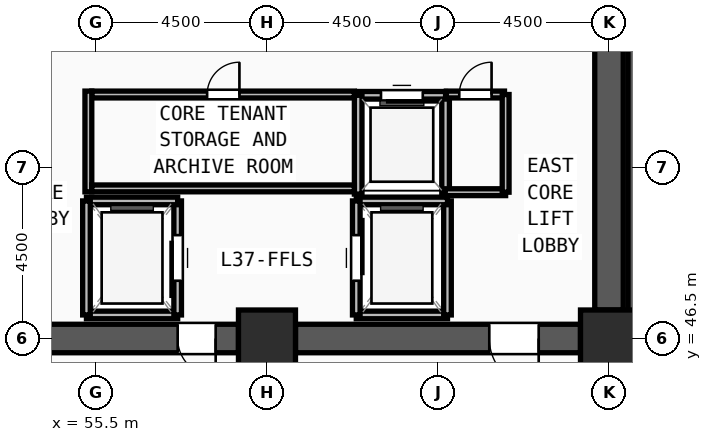
"""IFC4 building model, lengths in metres.
Left out: names, types, materials, properties, quantities, classifications, styles, units other than length and angle.
Written with IfcOpenShell. Run it as: python <this file> out.ifc"""

import sys

from ifc_helpers import new_model, si_unit, direction, frame, frame_2d, origin, origin_2d, place, context, subcontext, project, spatial, rectangle, extrude, source, transform, mapped, element, fill, save


model = new_model("IFC4")
c1 = context("Model", 3, precision=1e-05, world=origin(), true_north=direction((0.0, 1.0)))
c2 = subcontext(c1, "Body", "Model", "MODEL_VIEW")
j1 = project(units=[si_unit("LENGTHUNIT", "METRE"), si_unit("PLANEANGLEUNIT", "RADIAN")], contexts=[c1])
p1 = place(None, origin())
s1 = spatial("IfcSite", under=j1, at=p1, CompositionType="ELEMENT")
p2 = place(p1, origin())
s2 = spatial("IfcBuilding", under=s1, at=p2, CompositionType="ELEMENT")
p3 = place(p2, frame((0.0, 0.0, 144.0)))
s3 = spatial("IfcBuildingStorey", under=s2, at=p3, CompositionType="ELEMENT", Elevation=144.0)
m1 = source(origin(), c2, "Body", "SweptSolid", [
    extrude(rectangle(XDim=1.5, YDim=1.5, at=origin_2d()), origin(), (0.0, 0.0, 1.0), 3.75),
])
for number, where, z_axis, x_axis in (
    (1, (60.0, 46.5, 0.0), (0.0, 0.0, 1.0), (1.0, 0.0, 0.0)),
    (2, (69.0, 46.5, 0.0), (0.0, 0.0, 1.0), (1.0, 0.0, 0.0)),
):
    element("IfcColumn", number, at=place(p3, frame(where, z_axis=z_axis, x_axis=x_axis)), inside=s3, PredefinedType="COLUMN", context=c2, shape_type="MappedRepresentation", body=[
        mapped(m1, transform((0.0, 0.0, 0.0), x_axis=(1.0, 0.0, 0.0), y_axis=(0.0, 1.0, 0.0), z_axis=(0.0, 0.0, 1.0), scale=1.0)),
    ])
p4 = place(p3, frame((69.0, 60.75, 0.0), z_axis=(0.0, 0.0, 1.0), x_axis=(0.0, -1.0, 0.0)))
e3 = element("IfcWall", 3, at=p4, inside=s3, PredefinedType="SHEAR", context=c2, shape_type="SweptSolid", body=[
    extrude(rectangle(XDim=13.5, YDim=0.75, at=frame_2d((6.75, 0.0))), origin(), (0.0, 0.0, 1.0), 3.57),
])
m2 = source(origin(), c2, "Body", "SweptSolid", [
    extrude(rectangle(XDim=1.2, YDim=2.2, at=frame_2d((0.6, 1.1))), frame((0.0, 0.385, 0.0), z_axis=(0.0, -1.0, 0.0), x_axis=(1.0, 0.0, 0.0)), (0.0, 0.0, 1.0), 0.77),
])
p5 = place(p4, frame((1.2, 0.0, 0.0)))
e4 = element("IfcOpeningElement", 4, at=p5, cuts=e3, PredefinedType="OPENING", context=c2, shape_type="MappedRepresentation", body=[
    mapped(m2, transform((0.0, 0.0, 0.0), x_axis=(1.0, 0.0, 0.0), y_axis=(0.0, 1.0, 0.0), z_axis=(0.0, 0.0, 1.0), scale=1.0)),
])
p6 = place(p3, frame((68.25, 46.5, 0.0), z_axis=(0.0, 0.0, 1.0), x_axis=(-1.0, 0.0, 0.0)))
e5 = element("IfcWall", 5, at=p6, inside=s3, PredefinedType="SHEAR", context=c2, shape_type="SweptSolid", body=[
    extrude(rectangle(XDim=7.5, YDim=0.75, at=frame_2d((3.75, 0.0))), origin(), (0.0, 0.0, 1.0), 3.57),
])
m3 = source(origin(), c2, "Body", "SweptSolid", [
    extrude(rectangle(XDim=1.3, YDim=2.2, at=frame_2d((0.65, 1.1))), frame((0.0, 0.385, 0.0), z_axis=(0.0, -1.0, 0.0), x_axis=(1.0, 0.0, 0.0)), (0.0, 0.0, 1.0), 0.77),
])
p7 = place(p6, frame((1.1, 0.0, 0.0)))
e6 = element("IfcOpeningElement", 6, at=p7, cuts=e5, PredefinedType="OPENING", context=c2, shape_type="MappedRepresentation", body=[
    mapped(m3, transform((0.0, 0.0, 0.0), x_axis=(1.0, 0.0, 0.0), y_axis=(0.0, 1.0, 0.0), z_axis=(0.0, 0.0, 1.0), scale=1.0)),
])
p8 = place(p3, frame((59.25, 46.5, 0.0), z_axis=(0.0, 0.0, 1.0), x_axis=(-1.0, 0.0, 0.0)))
e7 = element("IfcWall", 7, at=p8, inside=s3, PredefinedType="SHEAR", context=c2, shape_type="SweptSolid", body=[
    extrude(rectangle(XDim=7.5, YDim=0.75, at=frame_2d((3.75, 0.0))), origin(), (0.0, 0.0, 1.0), 3.57),
])
p9 = place(p8, frame((5.1, 0.0, 0.0)))
e8 = element("IfcOpeningElement", 8, at=p9, cuts=e7, PredefinedType="OPENING", context=c2, shape_type="MappedRepresentation", body=[
    mapped(m3, transform((0.0, 0.0, 0.0), x_axis=(1.0, 0.0, 0.0), y_axis=(0.0, 1.0, 0.0), z_axis=(0.0, 0.0, 1.0), scale=1.0)),
])
m4 = source(origin(), c2, "Body", "SweptSolid", [
    extrude(rectangle(XDim=1.0, YDim=2.2, at=frame_2d((0.5, 1.1))), frame((0.0, 0.385, 0.0), z_axis=(0.0, -1.0, 0.0), x_axis=(1.0, 0.0, 0.0)), (0.0, 0.0, 1.0), 0.77),
])
p10 = place(p8, frame((0.6, 0.0, 0.0)))
e9 = element("IfcOpeningElement", 9, at=p10, cuts=e7, PredefinedType="OPENING", context=c2, shape_type="MappedRepresentation", body=[
    mapped(m4, transform((0.0, 0.0, 0.0), x_axis=(1.0, 0.0, 0.0), y_axis=(0.0, 1.0, 0.0), z_axis=(0.0, 0.0, 1.0), scale=1.0)),
])
p11 = place(p3, frame((69.62, 54.52, 0.0), z_axis=(0.0, 0.0, 1.0), x_axis=(0.0, -1.0, 0.0)))
e10 = element("IfcWall", 10, at=p11, inside=s3, PredefinedType="SOLIDWALL", context=c2, shape_type="SweptSolid", body=[
    extrude(rectangle(XDim=7.82, YDim=0.24, at=frame_2d((3.91, 0.0))), origin(), (0.0, 0.0, 1.0), 3.57),
])
p12 = place(p3, frame((55.25, 47.12, 0.0), z_axis=(0.0, 0.0, 1.0), x_axis=(1.0, 0.0, 0.0)))
e11 = element("IfcWall", 11, at=p12, inside=s3, PredefinedType="SOLIDWALL", context=c2, shape_type="SweptSolid", body=[
    extrude(rectangle(XDim=2.4, YDim=0.2, at=frame_2d((1.2, 0.0))), origin(), (0.0, 0.0, 1.0), 3.57),
])
p13 = place(p3, frame((57.65, 47.12, 0.0), z_axis=(0.0, 0.0, 1.0), x_axis=(0.0, 1.0, 0.0)))
e12 = element("IfcWall", 12, at=p13, inside=s3, PredefinedType="SOLIDWALL", context=c2, shape_type="SweptSolid", body=[
    extrude(rectangle(XDim=3.0, YDim=0.2, at=frame_2d((1.5, 0.0))), origin(), (0.0, 0.0, 1.0), 3.57),
])
m5 = source(origin(), c2, "Body", "SweptSolid", [
    extrude(rectangle(XDim=1.2, YDim=2.3, at=frame_2d((0.6, 1.15))), frame((0.0, 0.11, 0.0), z_axis=(0.0, -1.0, 0.0), x_axis=(1.0, 0.0, 0.0)), (0.0, 0.0, 1.0), 0.22),
])
p14 = place(p13, frame((0.9, 0.0, 0.0)))
e13 = element("IfcOpeningElement", 13, at=p14, cuts=e12, PredefinedType="OPENING", context=c2, shape_type="MappedRepresentation", body=[
    mapped(m5, transform((0.0, 0.0, 0.0), x_axis=(1.0, 0.0, 0.0), y_axis=(0.0, 1.0, 0.0), z_axis=(0.0, 0.0, 1.0), scale=1.0)),
])
p15 = place(p3, frame((57.65, 50.12, 0.0), z_axis=(0.0, 0.0, 1.0), x_axis=(-1.0, 0.0, 0.0)))
e14 = element("IfcWall", 14, at=p15, inside=s3, PredefinedType="SOLIDWALL", context=c2, shape_type="SweptSolid", body=[
    extrude(rectangle(XDim=2.4, YDim=0.2, at=frame_2d((1.2, 0.0))), origin(), (0.0, 0.0, 1.0), 3.57),
])
p16 = place(p3, frame((55.25, 50.12, 0.0), z_axis=(0.0, 0.0, 1.0), x_axis=(0.0, -1.0, 0.0)))
e15 = element("IfcWall", 15, at=p16, inside=s3, PredefinedType="SOLIDWALL", context=c2, shape_type="SweptSolid", body=[
    extrude(rectangle(XDim=3.0, YDim=0.2, at=frame_2d((1.5, 0.0))), origin(), (0.0, 0.0, 1.0), 3.57),
])
p17 = place(p3, frame((62.35, 47.12, 0.0), z_axis=(0.0, 0.0, 1.0), x_axis=(1.0, 0.0, 0.0)))
e16 = element("IfcWall", 16, at=p17, inside=s3, PredefinedType="SOLIDWALL", context=c2, shape_type="SweptSolid", body=[
    extrude(rectangle(XDim=2.4, YDim=0.2, at=frame_2d((1.2, 0.0))), origin(), (0.0, 0.0, 1.0), 3.57),
])
p18 = place(p3, frame((64.75, 47.12, 0.0), z_axis=(0.0, 0.0, 1.0), x_axis=(0.0, 1.0, 0.0)))
e17 = element("IfcWall", 17, at=p18, inside=s3, PredefinedType="SOLIDWALL", context=c2, shape_type="SweptSolid", body=[
    extrude(rectangle(XDim=3.0, YDim=0.2, at=frame_2d((1.5, 0.0))), origin(), (0.0, 0.0, 1.0), 3.57),
])
p19 = place(p3, frame((64.75, 50.12, 0.0), z_axis=(0.0, 0.0, 1.0), x_axis=(-1.0, 0.0, 0.0)))
e18 = element("IfcWall", 18, at=p19, inside=s3, PredefinedType="SOLIDWALL", context=c2, shape_type="SweptSolid", body=[
    extrude(rectangle(XDim=2.4, YDim=0.2, at=frame_2d((1.2, 0.0))), origin(), (0.0, 0.0, 1.0), 3.57),
])
p20 = place(p3, frame((62.35, 50.12, 0.0), z_axis=(0.0, 0.0, 1.0), x_axis=(0.0, -1.0, 0.0)))
e19 = element("IfcWall", 19, at=p20, inside=s3, PredefinedType="SOLIDWALL", context=c2, shape_type="SweptSolid", body=[
    extrude(rectangle(XDim=3.0, YDim=0.2, at=frame_2d((1.5, 0.0))), origin(), (0.0, 0.0, 1.0), 3.57),
])
p21 = place(p20, frame((0.9, 0.0, 0.0)))
e20 = element("IfcOpeningElement", 20, at=p21, cuts=e19, PredefinedType="OPENING", context=c2, shape_type="MappedRepresentation", body=[
    mapped(m5, transform((0.0, 0.0, 0.0), x_axis=(1.0, 0.0, 0.0), y_axis=(0.0, 1.0, 0.0), z_axis=(0.0, 0.0, 1.0), scale=1.0)),
])
p22 = place(p3, frame((64.7, 50.3, 0.0), z_axis=(0.0, 0.0, 1.0), x_axis=(0.0, 1.0, 0.0)))
e21 = element("IfcWall", 21, at=p22, inside=s3, PredefinedType="SOLIDWALL", context=c2, shape_type="SweptSolid", body=[
    extrude(rectangle(XDim=2.6, YDim=0.2, at=frame_2d((1.3, 0.0))), origin(), (0.0, 0.0, 1.0), 3.57),
])
p23 = place(p3, frame((64.7, 52.9, 0.0), z_axis=(0.0, 0.0, 1.0), x_axis=(-1.0, 0.0, 0.0)))
e22 = element("IfcWall", 22, at=p23, inside=s3, PredefinedType="SOLIDWALL", context=c2, shape_type="SweptSolid", body=[
    extrude(rectangle(XDim=2.3, YDim=0.2, at=frame_2d((1.15, 0.0))), origin(), (0.0, 0.0, 1.0), 3.57),
])
m6 = source(origin(), c2, "Body", "SweptSolid", [
    extrude(rectangle(XDim=1.1, YDim=2.2, at=frame_2d((0.55, 1.1))), frame((0.0, 0.11, 0.0), z_axis=(0.0, -1.0, 0.0), x_axis=(1.0, 0.0, 0.0)), (0.0, 0.0, 1.0), 0.22),
])
p24 = place(p23, frame((0.6, 0.0, 0.0)))
e23 = element("IfcOpeningElement", 23, at=p24, cuts=e22, PredefinedType="OPENING", context=c2, shape_type="MappedRepresentation", body=[
    mapped(m6, transform((0.0, 0.0, 0.0), x_axis=(1.0, 0.0, 0.0), y_axis=(0.0, 1.0, 0.0), z_axis=(0.0, 0.0, 1.0), scale=1.0)),
])
p25 = place(p3, frame((62.4, 52.9, 0.0), z_axis=(0.0, 0.0, 1.0), x_axis=(0.0, -1.0, 0.0)))
e24 = element("IfcWall", 24, at=p25, inside=s3, PredefinedType="SOLIDWALL", context=c2, shape_type="SweptSolid", body=[
    extrude(rectangle(XDim=2.6, YDim=0.2, at=frame_2d((1.3, 0.0))), origin(), (0.0, 0.0, 1.0), 3.57),
])
p26 = place(p3, frame((55.39, 52.92, 0.0), z_axis=(0.0, 0.0, 1.0), x_axis=(1.0, 0.0, 0.0)))
e25 = element("IfcWall", 25, at=p26, inside=s3, PredefinedType="PARTITIONING", context=c2, shape_type="SweptSolid", body=[
    extrude(rectangle(XDim=6.91, YDim=0.18, at=frame_2d((3.455, 0.0))), origin(), (0.0, 0.0, 1.0), 3.57),
])
m7 = source(origin(), c2, "Body", "SweptSolid", [
    extrude(rectangle(XDim=0.85, YDim=2.1, at=frame_2d((0.425, 1.05))), frame((0.0, 0.1, 0.0), z_axis=(0.0, -1.0, 0.0), x_axis=(1.0, 0.0, 0.0)), (0.0, 0.0, 1.0), 0.2),
])
p27 = place(p26, frame((3.035, 0.0, 0.0)))
e26 = element("IfcOpeningElement", 26, at=p27, cuts=e25, PredefinedType="OPENING", context=c2, shape_type="MappedRepresentation", body=[
    mapped(m7, transform((0.0, 0.0, 0.0), x_axis=(1.0, 0.0, 0.0), y_axis=(0.0, 1.0, 0.0), z_axis=(0.0, 0.0, 1.0), scale=1.0)),
])
p28 = place(p3, frame((64.72, 52.92, 0.0), z_axis=(0.0, 0.0, 1.0), x_axis=(1.0, 0.0, 0.0)))
e27 = element("IfcWall", 27, at=p28, inside=s3, PredefinedType="PARTITIONING", context=c2, shape_type="SweptSolid", body=[
    extrude(rectangle(XDim=1.53, YDim=0.18, at=frame_2d((0.765, 0.0))), origin(), (0.0, 0.0, 1.0), 3.57),
])
p29 = place(p28, frame((0.34, 0.0, 0.0)))
e28 = element("IfcOpeningElement", 28, at=p29, cuts=e27, PredefinedType="OPENING", context=c2, shape_type="MappedRepresentation", body=[
    mapped(m7, transform((0.0, 0.0, 0.0), x_axis=(1.0, 0.0, 0.0), y_axis=(0.0, 1.0, 0.0), z_axis=(0.0, 0.0, 1.0), scale=1.0)),
])
p30 = place(p3, frame((64.69, 50.35, 0.0), z_axis=(0.0, 0.0, 1.0), x_axis=(1.0, 0.0, 0.0)))
e29 = element("IfcWall", 29, at=p30, inside=s3, PredefinedType="PARTITIONING", context=c2, shape_type="SweptSolid", body=[
    extrude(rectangle(XDim=1.59, YDim=0.18, at=frame_2d((0.795, 0.0))), origin(), (0.0, 0.0, 1.0), 3.57),
])
p31 = place(p3, frame((66.28, 50.35, 0.0), z_axis=(0.0, 0.0, 1.0), x_axis=(0.0, 1.0, 0.0)))
e30 = element("IfcWall", 30, at=p31, inside=s3, PredefinedType="PARTITIONING", context=c2, shape_type="SweptSolid", body=[
    extrude(rectangle(XDim=2.57, YDim=0.18, at=frame_2d((1.285, 0.0))), origin(), (0.0, 0.0, 1.0), 3.57),
])
p32 = place(p3, frame((55.3, 50.36, 0.0), z_axis=(0.0, 0.0, 1.0), x_axis=(0.0, 1.0, 0.0)))
e31 = element("IfcWall", 31, at=p32, inside=s3, PredefinedType="PARTITIONING", context=c2, shape_type="SweptSolid", body=[
    extrude(rectangle(XDim=2.65, YDim=0.18, at=frame_2d((1.325, 0.0))), origin(), (0.0, 0.0, 1.0), 3.57),
])
p33 = place(p3, frame((55.39, 50.45, 0.0), z_axis=(0.0, 0.0, 1.0), x_axis=(1.0, 0.0, 0.0)))
e32 = element("IfcWall", 32, at=p33, inside=s3, PredefinedType="PARTITIONING", context=c2, shape_type="SweptSolid", body=[
    extrude(rectangle(XDim=6.91, YDim=0.18, at=frame_2d((3.455, 0.0))), origin(), (0.0, 0.0, 1.0), 3.57),
])
m8 = source(origin(), c2, "Body", "SweptSolid", [
    extrude(rectangle(XDim=1.0, YDim=2.2, at=frame_2d((0.5, 1.1))), frame((0.0, 0.025, 0.0), z_axis=(0.0, -1.0, 0.0), x_axis=(1.0, 0.0, 0.0)), (0.0, 0.0, 1.0), 0.05),
])
p34 = place(p10, origin())
e33 = element("IfcDoor", 33, at=p34, inside=s3, OperationType="SINGLE_SWING_LEFT", PredefinedType="DOOR", context=c2, shape_type="MappedRepresentation", body=[
    mapped(m8, transform((0.0, 0.0, 0.0), x_axis=(1.0, 0.0, 0.0), y_axis=(0.0, 1.0, 0.0), z_axis=(0.0, 0.0, 1.0), scale=1.0)),
])
fill(e9, e33)
m9 = source(origin(), c2, "Body", "SweptSolid", [
    extrude(rectangle(XDim=1.3, YDim=2.2, at=frame_2d((0.65, 1.1))), frame((0.0, 0.025, 0.0), z_axis=(0.0, -1.0, 0.0), x_axis=(1.0, 0.0, 0.0)), (0.0, 0.0, 1.0), 0.05),
])
p35 = place(p7, origin())
e34 = element("IfcDoor", 34, at=p35, inside=s3, OperationType="SINGLE_SWING_LEFT", PredefinedType="DOOR", context=c2, shape_type="MappedRepresentation", body=[
    mapped(m9, transform((0.0, 0.0, 0.0), x_axis=(1.0, 0.0, 0.0), y_axis=(0.0, 1.0, 0.0), z_axis=(0.0, 0.0, 1.0), scale=1.0)),
])
fill(e6, e34)
m10 = source(origin(), c2, "Body", "SweptSolid", [
    extrude(rectangle(XDim=1.2, YDim=2.3, at=frame_2d((0.6, 1.15))), frame((0.0, 0.025, 0.0), z_axis=(0.0, -1.0, 0.0), x_axis=(1.0, 0.0, 0.0)), (0.0, 0.0, 1.0), 0.05),
])
p36 = place(p14, origin())
e35 = element("IfcDoor", 35, at=p36, inside=s3, OperationType="SLIDING_TO_LEFT", PredefinedType="DOOR", context=c2, shape_type="MappedRepresentation", body=[
    mapped(m10, transform((0.0, 0.0, 0.0), x_axis=(1.0, 0.0, 0.0), y_axis=(0.0, 1.0, 0.0), z_axis=(0.0, 0.0, 1.0), scale=1.0)),
])
fill(e13, e35)
p37 = place(p21, origin())
e36 = element("IfcDoor", 36, at=p37, inside=s3, OperationType="SLIDING_TO_LEFT", PredefinedType="DOOR", context=c2, shape_type="MappedRepresentation", body=[
    mapped(m10, transform((0.0, 0.0, 0.0), x_axis=(1.0, 0.0, 0.0), y_axis=(0.0, 1.0, 0.0), z_axis=(0.0, 0.0, 1.0), scale=1.0)),
])
fill(e20, e36)
m11 = source(origin(), c2, "Body", "SweptSolid", [
    extrude(rectangle(XDim=1.1, YDim=2.2, at=frame_2d((0.55, 1.1))), frame((0.0, 0.025, 0.0), z_axis=(0.0, -1.0, 0.0), x_axis=(1.0, 0.0, 0.0)), (0.0, 0.0, 1.0), 0.05),
])
p38 = place(p24, origin())
e37 = element("IfcDoor", 37, at=p38, inside=s3, OperationType="SLIDING_TO_LEFT", PredefinedType="DOOR", context=c2, shape_type="MappedRepresentation", body=[
    mapped(m11, transform((0.0, 0.0, 0.0), x_axis=(1.0, 0.0, 0.0), y_axis=(0.0, 1.0, 0.0), z_axis=(0.0, 0.0, 1.0), scale=1.0)),
])
fill(e23, e37)
m12 = source(origin(), c2, "Body", "SweptSolid", [
    extrude(rectangle(XDim=0.85, YDim=2.1, at=frame_2d((0.425, 1.05))), frame((0.0, 0.025, 0.0), z_axis=(0.0, -1.0, 0.0), x_axis=(1.0, 0.0, 0.0)), (0.0, 0.0, 1.0), 0.05),
])
p39 = place(p27, origin())
e38 = element("IfcDoor", 38, at=p39, inside=s3, OperationType="SINGLE_SWING_RIGHT", PredefinedType="DOOR", context=c2, shape_type="MappedRepresentation", body=[
    mapped(m12, transform((0.0, 0.0, 0.0), x_axis=(1.0, 0.0, 0.0), y_axis=(0.0, 1.0, 0.0), z_axis=(0.0, 0.0, 1.0), scale=1.0)),
])
fill(e26, e38)
p40 = place(p29, origin())
e39 = element("IfcDoor", 39, at=p40, inside=s3, OperationType="SINGLE_SWING_RIGHT", PredefinedType="DOOR", context=c2, shape_type="MappedRepresentation", body=[
    mapped(m12, transform((0.0, 0.0, 0.0), x_axis=(1.0, 0.0, 0.0), y_axis=(0.0, 1.0, 0.0), z_axis=(0.0, 0.0, 1.0), scale=1.0)),
])
fill(e28, e39)
save(model, sys.argv[1])
